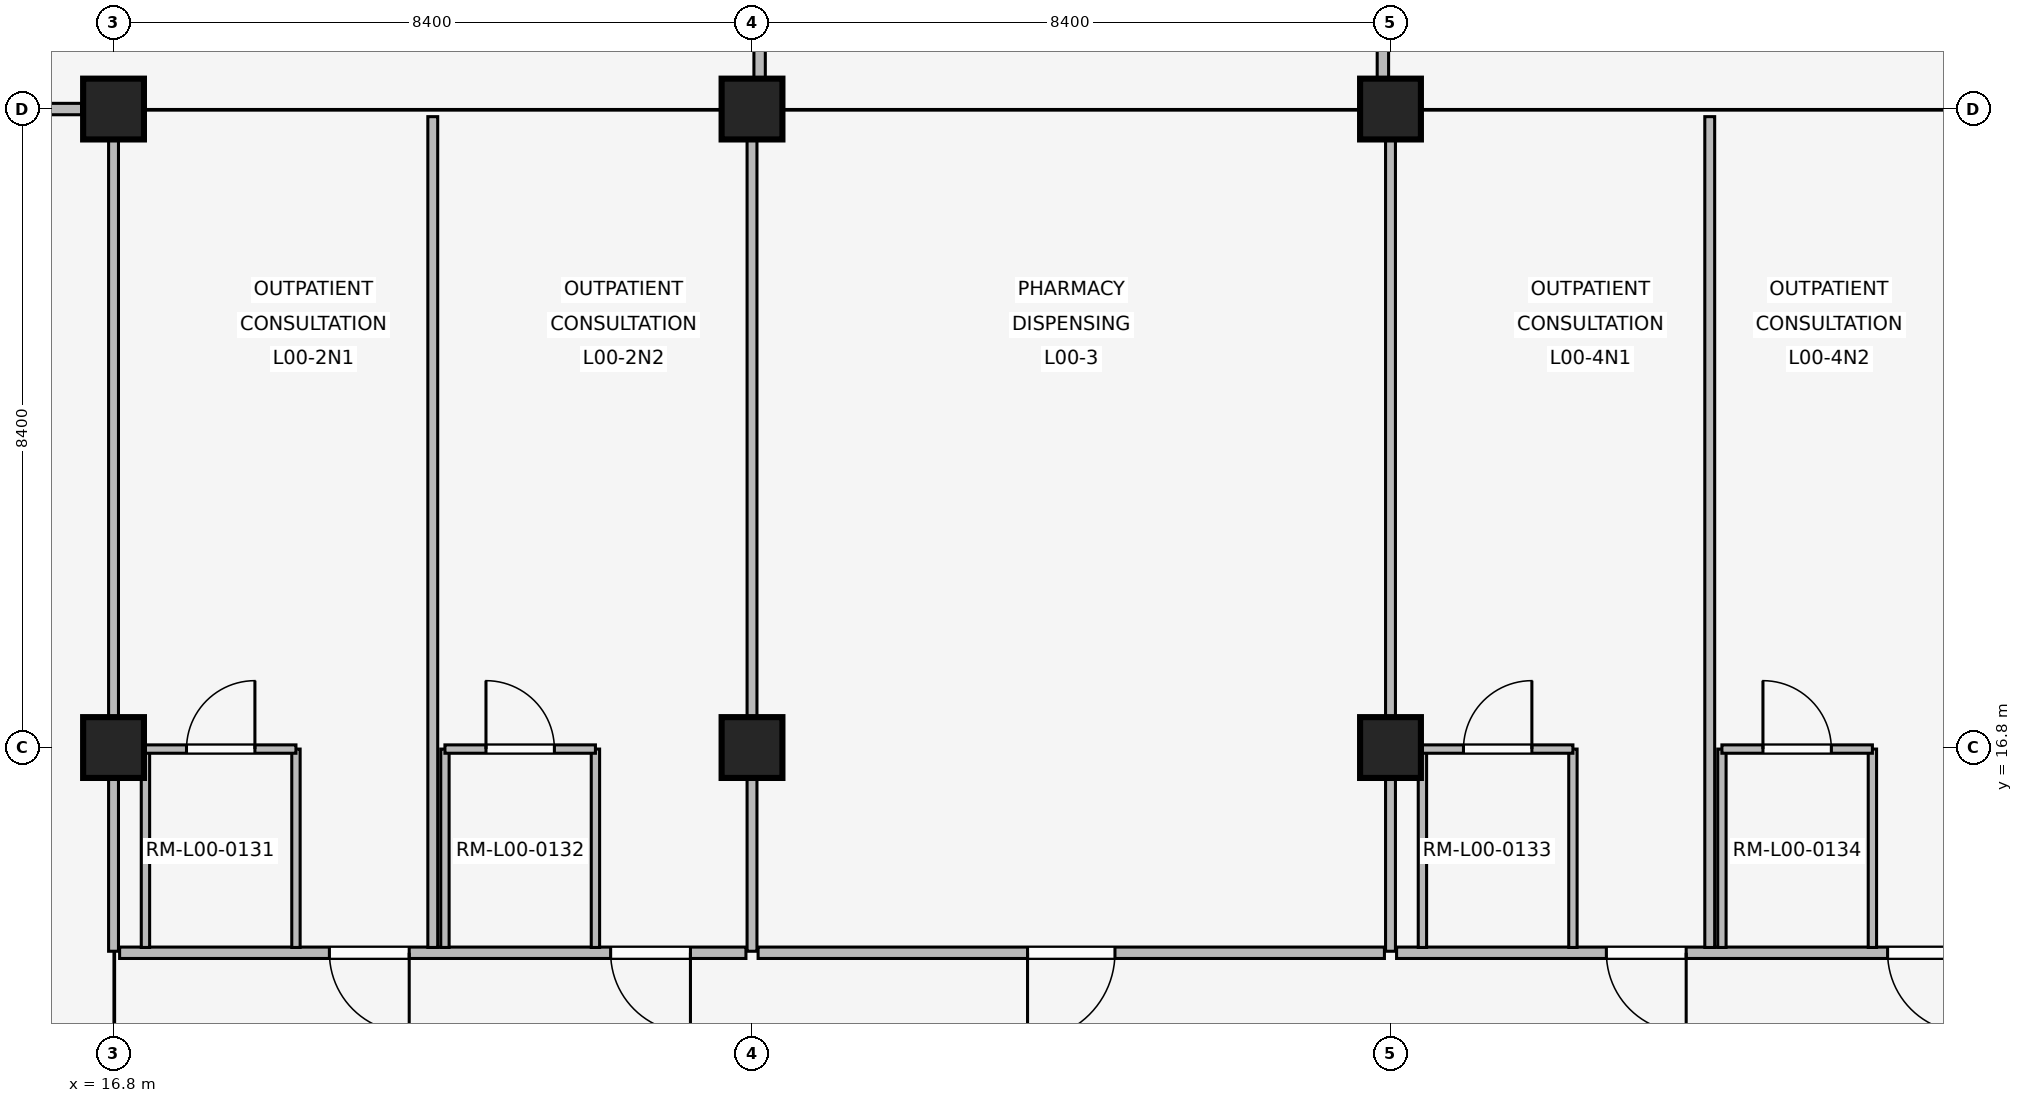
"""IFC4 building model, lengths in metres.
Left out: names, types, materials, properties, quantities, classifications, styles, units other than length and angle.
Written with IfcOpenShell. Run it as: python <this file> out.ifc"""

import sys

from ifc_helpers import new_model, si_unit, direction, frame, frame_2d, origin, origin_2d, place, context, subcontext, project, spatial, rectangle, extrude, element, fill, save


model = new_model("IFC4")
c1 = context("Model", 3, precision=1e-05, world=origin(), true_north=direction((0.0, 1.0)))
c2 = subcontext(c1, "Body", "Model", "MODEL_VIEW")
j1 = project(units=[si_unit("LENGTHUNIT", "METRE"), si_unit("PLANEANGLEUNIT", "RADIAN")], contexts=[c1])
p1 = place(None, origin())
s1 = spatial("IfcSite", under=j1, at=p1, CompositionType="ELEMENT")
p2 = place(p1, origin())
s2 = spatial("IfcBuilding", under=s1, at=p2, CompositionType="ELEMENT")
p3 = place(p2, origin())
s3 = spatial("IfcBuildingStorey", under=s2, at=p3, CompositionType="ELEMENT", Elevation=0.0)
for number, where, z_axis, x_axis in (
    (1, (16.8, 16.8, 0.0), (0.0, 0.0, 1.0), (1.0, 0.0, 0.0)),
    (2, (16.8, 25.2, 0.0), (0.0, 0.0, 1.0), (1.0, 0.0, 0.0)),
    (3, (25.2, 16.8, 0.0), (0.0, 0.0, 1.0), (1.0, 0.0, 0.0)),
    (4, (25.2, 25.2, 0.0), (0.0, 0.0, 1.0), (1.0, 0.0, 0.0)),
    (5, (33.6, 16.8, 0.0), (0.0, 0.0, 1.0), (1.0, 0.0, 0.0)),
    (6, (33.6, 25.2, 0.0), (0.0, 0.0, 1.0), (1.0, 0.0, 0.0)),
):
    element("IfcColumn", number, at=place(p3, frame(where, z_axis=z_axis, x_axis=x_axis)), inside=s3, PredefinedType="COLUMN", context=c2, shape_type="SweptSolid", body=[
        extrude(rectangle(XDim=0.8, YDim=0.8, at=origin_2d()), origin(), (0.0, 0.0, 1.0), 4.8),
    ])
p4 = place(p3, frame((16.8, 14.12, 0.0), z_axis=(0.0, 0.0, 1.0), x_axis=(0.0, 1.0, 0.0)))
e7 = element("IfcWall", 7, at=p4, inside=s3, PredefinedType="PARTITIONING", context=c2, shape_type="SweptSolid", body=[
    extrude(rectangle(XDim=10.94, YDim=0.13, at=frame_2d((5.47, 0.0))), origin(), (0.0, 0.0, 1.0), 3.8),
])
p5 = place(p3, frame((25.12, 14.1, 0.0), z_axis=(0.0, 0.0, 1.0), x_axis=(-1.0, 0.0, 0.0)))
e8 = element("IfcWall", 8, at=p5, inside=s3, PredefinedType="PARTITIONING", context=c2, shape_type="SweptSolid", body=[
    extrude(rectangle(XDim=8.24, YDim=0.15, at=frame_2d((4.12, 0.0))), origin(), (0.0, 0.0, 1.0), 3.8),
])
p6 = place(p5, frame((0.73, 0.0, 0.0)))
e9 = element("IfcOpeningElement", 9, at=p6, cuts=e8, PredefinedType="OPENING", context=c2, shape_type="SweptSolid", body=[
    extrude(rectangle(XDim=1.05, YDim=2.2, at=frame_2d((0.525, 1.1))), frame((0.0, 0.085, 0.0), z_axis=(0.0, -1.0, 0.0), x_axis=(1.0, 0.0, 0.0)), (0.0, 0.0, 1.0), 0.17),
])
p7 = place(p5, frame((4.43, 0.0, 0.0)))
e10 = element("IfcOpeningElement", 10, at=p7, cuts=e8, PredefinedType="OPENING", context=c2, shape_type="SweptSolid", body=[
    extrude(rectangle(XDim=1.05, YDim=2.2, at=frame_2d((0.525, 1.1))), frame((0.0, 0.085, 0.0), z_axis=(0.0, -1.0, 0.0), x_axis=(1.0, 0.0, 0.0)), (0.0, 0.0, 1.0), 0.17),
])
p8 = place(p3, frame((21.0, 14.17, 0.0), z_axis=(0.0, 0.0, 1.0), x_axis=(0.0, 1.0, 0.0)))
e11 = element("IfcWall", 11, at=p8, inside=s3, PredefinedType="PARTITIONING", context=c2, shape_type="SweptSolid", body=[
    extrude(rectangle(XDim=10.93, YDim=0.13, at=frame_2d((5.465, 0.0))), origin(), (0.0, 0.0, 1.0), 3.8),
])
for number, where, z_axis, x_axis in (
    (12, (17.22, 14.17, 0.0), (0.0, 0.0, 1.0), (0.0, 1.0, 0.0)),
    (13, (19.2, 14.17, 0.0), (0.0, 0.0, 1.0), (0.0, 1.0, 0.0)),
):
    element("IfcWall", number, at=place(p3, frame(where, z_axis=z_axis, x_axis=x_axis)), inside=s3, PredefinedType="PARTITIONING", context=c2, shape_type="SweptSolid", body=[
        extrude(rectangle(XDim=2.61, YDim=0.11, at=frame_2d((1.305, 0.0))), origin(), (0.0, 0.0, 1.0), 3.8),
    ])
p9 = place(p3, frame((17.22, 16.78, 0.0), z_axis=(0.0, 0.0, 1.0), x_axis=(1.0, 0.0, 0.0)))
e14 = element("IfcWall", 14, at=p9, inside=s3, PredefinedType="PARTITIONING", context=c2, shape_type="SweptSolid", body=[
    extrude(rectangle(XDim=1.98, YDim=0.11, at=frame_2d((0.99, 0.0))), origin(), (0.0, 0.0, 1.0), 3.8),
])
p10 = place(p9, frame((0.54, 0.0, 0.0)))
e15 = element("IfcOpeningElement", 15, at=p10, cuts=e14, PredefinedType="OPENING", context=c2, shape_type="SweptSolid", body=[
    extrude(rectangle(XDim=0.9, YDim=2.1, at=frame_2d((0.45, 1.05))), frame((0.0, 0.065, 0.0), z_axis=(0.0, -1.0, 0.0), x_axis=(1.0, 0.0, 0.0)), (0.0, 0.0, 1.0), 0.13),
])
for number, where, z_axis, x_axis in (
    (16, (21.16, 14.17, 0.0), (0.0, 0.0, 1.0), (0.0, 1.0, 0.0)),
    (17, (23.14, 14.17, 0.0), (0.0, 0.0, 1.0), (0.0, 1.0, 0.0)),
):
    element("IfcWall", number, at=place(p3, frame(where, z_axis=z_axis, x_axis=x_axis)), inside=s3, PredefinedType="PARTITIONING", context=c2, shape_type="SweptSolid", body=[
        extrude(rectangle(XDim=2.61, YDim=0.11, at=frame_2d((1.305, 0.0))), origin(), (0.0, 0.0, 1.0), 3.8),
    ])
p11 = place(p3, frame((21.16, 16.78, 0.0), z_axis=(0.0, 0.0, 1.0), x_axis=(1.0, 0.0, 0.0)))
e18 = element("IfcWall", 18, at=p11, inside=s3, PredefinedType="PARTITIONING", context=c2, shape_type="SweptSolid", body=[
    extrude(rectangle(XDim=1.98, YDim=0.11, at=frame_2d((0.99, 0.0))), origin(), (0.0, 0.0, 1.0), 3.8),
])
p12 = place(p11, frame((0.54, 0.0, 0.0)))
e19 = element("IfcOpeningElement", 19, at=p12, cuts=e18, PredefinedType="OPENING", context=c2, shape_type="SweptSolid", body=[
    extrude(rectangle(XDim=0.9, YDim=2.1, at=frame_2d((0.45, 1.05))), frame((0.0, 0.065, 0.0), z_axis=(0.0, -1.0, 0.0), x_axis=(1.0, 0.0, 0.0)), (0.0, 0.0, 1.0), 0.13),
])
p13 = place(p3, frame((25.2, 14.12, 0.0), z_axis=(0.0, 0.0, 1.0), x_axis=(0.0, 1.0, 0.0)))
e20 = element("IfcWall", 20, at=p13, inside=s3, PredefinedType="PARTITIONING", context=c2, shape_type="SweptSolid", body=[
    extrude(rectangle(XDim=10.94, YDim=0.13, at=frame_2d((5.47, 0.0))), origin(), (0.0, 0.0, 1.0), 3.8),
])
p14 = place(p3, frame((33.52, 14.1, 0.0), z_axis=(0.0, 0.0, 1.0), x_axis=(-1.0, 0.0, 0.0)))
e21 = element("IfcWall", 21, at=p14, inside=s3, PredefinedType="PARTITIONING", context=c2, shape_type="SweptSolid", body=[
    extrude(rectangle(XDim=8.24, YDim=0.15, at=frame_2d((4.12, 0.0))), origin(), (0.0, 0.0, 1.0), 3.8),
])
p15 = place(p14, frame((3.545, 0.0, 0.0)))
e22 = element("IfcOpeningElement", 22, at=p15, cuts=e21, PredefinedType="OPENING", context=c2, shape_type="SweptSolid", body=[
    extrude(rectangle(XDim=1.15, YDim=2.2, at=frame_2d((0.575, 1.1))), frame((0.0, 0.085, 0.0), z_axis=(0.0, -1.0, 0.0), x_axis=(1.0, 0.0, 0.0)), (0.0, 0.0, 1.0), 0.17),
])
p16 = place(p3, frame((33.6, 14.12, 0.0), z_axis=(0.0, 0.0, 1.0), x_axis=(0.0, 1.0, 0.0)))
e23 = element("IfcWall", 23, at=p16, inside=s3, PredefinedType="PARTITIONING", context=c2, shape_type="SweptSolid", body=[
    extrude(rectangle(XDim=10.94, YDim=0.13, at=frame_2d((5.47, 0.0))), origin(), (0.0, 0.0, 1.0), 3.8),
])
p17 = place(p3, frame((41.64, 14.1, 0.0), z_axis=(0.0, 0.0, 1.0), x_axis=(-1.0, 0.0, 0.0)))
e24 = element("IfcWall", 24, at=p17, inside=s3, PredefinedType="PARTITIONING", context=c2, shape_type="SweptSolid", body=[
    extrude(rectangle(XDim=7.96, YDim=0.15, at=frame_2d((3.98, 0.0))), origin(), (0.0, 0.0, 1.0), 3.8),
])
p18 = place(p17, frame((0.45, 0.0, 0.0)))
e25 = element("IfcOpeningElement", 25, at=p18, cuts=e24, PredefinedType="OPENING", context=c2, shape_type="SweptSolid", body=[
    extrude(rectangle(XDim=1.05, YDim=2.2, at=frame_2d((0.525, 1.1))), frame((0.0, 0.085, 0.0), z_axis=(0.0, -1.0, 0.0), x_axis=(1.0, 0.0, 0.0)), (0.0, 0.0, 1.0), 0.17),
])
p19 = place(p17, frame((4.15, 0.0, 0.0)))
e26 = element("IfcOpeningElement", 26, at=p19, cuts=e24, PredefinedType="OPENING", context=c2, shape_type="SweptSolid", body=[
    extrude(rectangle(XDim=1.05, YDim=2.2, at=frame_2d((0.525, 1.1))), frame((0.0, 0.085, 0.0), z_axis=(0.0, -1.0, 0.0), x_axis=(1.0, 0.0, 0.0)), (0.0, 0.0, 1.0), 0.17),
])
p20 = place(p3, frame((37.8, 14.17, 0.0), z_axis=(0.0, 0.0, 1.0), x_axis=(0.0, 1.0, 0.0)))
e27 = element("IfcWall", 27, at=p20, inside=s3, PredefinedType="PARTITIONING", context=c2, shape_type="SweptSolid", body=[
    extrude(rectangle(XDim=10.93, YDim=0.13, at=frame_2d((5.465, 0.0))), origin(), (0.0, 0.0, 1.0), 3.8),
])
for number, where, z_axis, x_axis in (
    (28, (34.02, 14.17, 0.0), (0.0, 0.0, 1.0), (0.0, 1.0, 0.0)),
    (29, (36.0, 14.17, 0.0), (0.0, 0.0, 1.0), (0.0, 1.0, 0.0)),
):
    element("IfcWall", number, at=place(p3, frame(where, z_axis=z_axis, x_axis=x_axis)), inside=s3, PredefinedType="PARTITIONING", context=c2, shape_type="SweptSolid", body=[
        extrude(rectangle(XDim=2.61, YDim=0.11, at=frame_2d((1.305, 0.0))), origin(), (0.0, 0.0, 1.0), 3.8),
    ])
p21 = place(p3, frame((34.02, 16.78, 0.0), z_axis=(0.0, 0.0, 1.0), x_axis=(1.0, 0.0, 0.0)))
e30 = element("IfcWall", 30, at=p21, inside=s3, PredefinedType="PARTITIONING", context=c2, shape_type="SweptSolid", body=[
    extrude(rectangle(XDim=1.98, YDim=0.11, at=frame_2d((0.99, 0.0))), origin(), (0.0, 0.0, 1.0), 3.8),
])
p22 = place(p21, frame((0.54, 0.0, 0.0)))
e31 = element("IfcOpeningElement", 31, at=p22, cuts=e30, PredefinedType="OPENING", context=c2, shape_type="SweptSolid", body=[
    extrude(rectangle(XDim=0.9, YDim=2.1, at=frame_2d((0.45, 1.05))), frame((0.0, 0.065, 0.0), z_axis=(0.0, -1.0, 0.0), x_axis=(1.0, 0.0, 0.0)), (0.0, 0.0, 1.0), 0.13),
])
for number, where, z_axis, x_axis in (
    (32, (37.96, 14.17, 0.0), (0.0, 0.0, 1.0), (0.0, 1.0, 0.0)),
    (33, (39.94, 14.17, 0.0), (0.0, 0.0, 1.0), (0.0, 1.0, 0.0)),
):
    element("IfcWall", number, at=place(p3, frame(where, z_axis=z_axis, x_axis=x_axis)), inside=s3, PredefinedType="PARTITIONING", context=c2, shape_type="SweptSolid", body=[
        extrude(rectangle(XDim=2.61, YDim=0.11, at=frame_2d((1.305, 0.0))), origin(), (0.0, 0.0, 1.0), 3.8),
    ])
p23 = place(p3, frame((37.96, 16.78, 0.0), z_axis=(0.0, 0.0, 1.0), x_axis=(1.0, 0.0, 0.0)))
e34 = element("IfcWall", 34, at=p23, inside=s3, PredefinedType="PARTITIONING", context=c2, shape_type="SweptSolid", body=[
    extrude(rectangle(XDim=1.98, YDim=0.11, at=frame_2d((0.99, 0.0))), origin(), (0.0, 0.0, 1.0), 3.8),
])
p24 = place(p23, frame((0.54, 0.0, 0.0)))
e35 = element("IfcOpeningElement", 35, at=p24, cuts=e34, PredefinedType="OPENING", context=c2, shape_type="SweptSolid", body=[
    extrude(rectangle(XDim=0.9, YDim=2.1, at=frame_2d((0.45, 1.05))), frame((0.0, 0.065, 0.0), z_axis=(0.0, -1.0, 0.0), x_axis=(1.0, 0.0, 0.0)), (0.0, 0.0, 1.0), 0.13),
])
p25 = place(p3, frame((0.42, 25.2, 0.0), z_axis=(0.0, 0.0, 1.0), x_axis=(1.0, 0.0, 0.0)))
e36 = element("IfcWall", 36, at=p25, inside=s3, PredefinedType="PARTITIONING", context=c2, shape_type="SweptSolid", body=[
    extrude(rectangle(XDim=15.96, YDim=0.15, at=frame_2d((7.98, 0.0))), origin(), (0.0, 0.0, 1.0), 3.8),
])
p26 = place(p25, frame((3.4, 0.0, 0.0)))
e37 = element("IfcOpeningElement", 37, at=p26, cuts=e36, PredefinedType="OPENING", context=c2, shape_type="SweptSolid", body=[
    extrude(rectangle(XDim=1.4, YDim=2.25, at=frame_2d((0.7, 1.125))), frame((0.0, 0.085, 0.0), z_axis=(0.0, -1.0, 0.0), x_axis=(1.0, 0.0, 0.0)), (0.0, 0.0, 1.0), 0.17),
])
p27 = place(p3, frame((25.3, 25.6, 0.0), z_axis=(0.0, 0.0, 1.0), x_axis=(0.0, 1.0, 0.0)))
e38 = element("IfcWall", 38, at=p27, inside=s3, PredefinedType="PARTITIONING", context=c2, shape_type="SweptSolid", body=[
    extrude(rectangle(XDim=7.6, YDim=0.15, at=frame_2d((3.8, 0.0))), origin(), (0.0, 0.0, 1.0), 3.8),
])
p28 = place(p27, frame((2.85, 0.0, 0.0)))
e39 = element("IfcOpeningElement", 39, at=p28, cuts=e38, PredefinedType="OPENING", context=c2, shape_type="SweptSolid", body=[
    extrude(rectangle(XDim=1.9, YDim=2.4, at=frame_2d((0.95, 1.2))), frame((0.0, 0.085, 0.0), z_axis=(0.0, -1.0, 0.0), x_axis=(1.0, 0.0, 0.0)), (0.0, 0.0, 1.0), 0.17),
])
p29 = place(p3, frame((33.5, 25.6, 0.0), z_axis=(0.0, 0.0, 1.0), x_axis=(0.0, 1.0, 0.0)))
e40 = element("IfcWall", 40, at=p29, inside=s3, PredefinedType="PARTITIONING", context=c2, shape_type="SweptSolid", body=[
    extrude(rectangle(XDim=32.8, YDim=0.15, at=frame_2d((16.4, 0.0))), origin(), (0.0, 0.0, 1.0), 3.8),
])
p30 = place(p29, frame((3.4, 0.0, 0.0)))
e41 = element("IfcOpeningElement", 41, at=p30, cuts=e40, PredefinedType="OPENING", context=c2, shape_type="SweptSolid", body=[
    extrude(rectangle(XDim=1.05, YDim=2.2, at=frame_2d((0.525, 1.1))), frame((0.0, 0.085, 0.0), z_axis=(0.0, -1.0, 0.0), x_axis=(1.0, 0.0, 0.0)), (0.0, 0.0, 1.0), 0.17),
])
p31 = place(p6, origin())
e42 = element("IfcDoor", 42, at=p31, inside=s3, OperationType="SINGLE_SWING_LEFT", PredefinedType="DOOR", context=c2, shape_type="SweptSolid", body=[
    extrude(rectangle(XDim=1.05, YDim=2.2, at=frame_2d((0.525, 1.1))), frame((0.0, 0.025, 0.0), z_axis=(0.0, -1.0, 0.0), x_axis=(1.0, 0.0, 0.0)), (0.0, 0.0, 1.0), 0.05),
])
fill(e9, e42)
p32 = place(p7, origin())
e43 = element("IfcDoor", 43, at=p32, inside=s3, OperationType="SINGLE_SWING_LEFT", PredefinedType="DOOR", context=c2, shape_type="SweptSolid", body=[
    extrude(rectangle(XDim=1.05, YDim=2.2, at=frame_2d((0.525, 1.1))), frame((0.0, 0.025, 0.0), z_axis=(0.0, -1.0, 0.0), x_axis=(1.0, 0.0, 0.0)), (0.0, 0.0, 1.0), 0.05),
])
fill(e10, e43)
p33 = place(p10, origin())
e44 = element("IfcDoor", 44, at=p33, inside=s3, OperationType="SINGLE_SWING_RIGHT", PredefinedType="DOOR", context=c2, shape_type="SweptSolid", body=[
    extrude(rectangle(XDim=0.9, YDim=2.1, at=frame_2d((0.45, 1.05))), frame((0.0, 0.025, 0.0), z_axis=(0.0, -1.0, 0.0), x_axis=(1.0, 0.0, 0.0)), (0.0, 0.0, 1.0), 0.05),
])
fill(e15, e44)
p34 = place(p12, origin())
e45 = element("IfcDoor", 45, at=p34, inside=s3, OperationType="SINGLE_SWING_LEFT", PredefinedType="DOOR", context=c2, shape_type="SweptSolid", body=[
    extrude(rectangle(XDim=0.9, YDim=2.1, at=frame_2d((0.45, 1.05))), frame((0.0, 0.025, 0.0), z_axis=(0.0, -1.0, 0.0), x_axis=(1.0, 0.0, 0.0)), (0.0, 0.0, 1.0), 0.05),
])
fill(e19, e45)
p35 = place(p15, origin())
e46 = element("IfcDoor", 46, at=p35, inside=s3, OperationType="SINGLE_SWING_RIGHT", PredefinedType="DOOR", context=c2, shape_type="SweptSolid", body=[
    extrude(rectangle(XDim=1.15, YDim=2.2, at=frame_2d((0.575, 1.1))), frame((0.0, 0.025, 0.0), z_axis=(0.0, -1.0, 0.0), x_axis=(1.0, 0.0, 0.0)), (0.0, 0.0, 1.0), 0.05),
])
fill(e22, e46)
p36 = place(p18, origin())
e47 = element("IfcDoor", 47, at=p36, inside=s3, OperationType="SINGLE_SWING_LEFT", PredefinedType="DOOR", context=c2, shape_type="SweptSolid", body=[
    extrude(rectangle(XDim=1.05, YDim=2.2, at=frame_2d((0.525, 1.1))), frame((0.0, 0.025, 0.0), z_axis=(0.0, -1.0, 0.0), x_axis=(1.0, 0.0, 0.0)), (0.0, 0.0, 1.0), 0.05),
])
fill(e25, e47)
p37 = place(p19, origin())
e48 = element("IfcDoor", 48, at=p37, inside=s3, OperationType="SINGLE_SWING_LEFT", PredefinedType="DOOR", context=c2, shape_type="SweptSolid", body=[
    extrude(rectangle(XDim=1.05, YDim=2.2, at=frame_2d((0.525, 1.1))), frame((0.0, 0.025, 0.0), z_axis=(0.0, -1.0, 0.0), x_axis=(1.0, 0.0, 0.0)), (0.0, 0.0, 1.0), 0.05),
])
fill(e26, e48)
p38 = place(p22, origin())
e49 = element("IfcDoor", 49, at=p38, inside=s3, OperationType="SINGLE_SWING_RIGHT", PredefinedType="DOOR", context=c2, shape_type="SweptSolid", body=[
    extrude(rectangle(XDim=0.9, YDim=2.1, at=frame_2d((0.45, 1.05))), frame((0.0, 0.025, 0.0), z_axis=(0.0, -1.0, 0.0), x_axis=(1.0, 0.0, 0.0)), (0.0, 0.0, 1.0), 0.05),
])
fill(e31, e49)
p39 = place(p24, origin())
e50 = element("IfcDoor", 50, at=p39, inside=s3, OperationType="SINGLE_SWING_LEFT", PredefinedType="DOOR", context=c2, shape_type="SweptSolid", body=[
    extrude(rectangle(XDim=0.9, YDim=2.1, at=frame_2d((0.45, 1.05))), frame((0.0, 0.025, 0.0), z_axis=(0.0, -1.0, 0.0), x_axis=(1.0, 0.0, 0.0)), (0.0, 0.0, 1.0), 0.05),
])
fill(e35, e50)
save(model, sys.argv[1])
